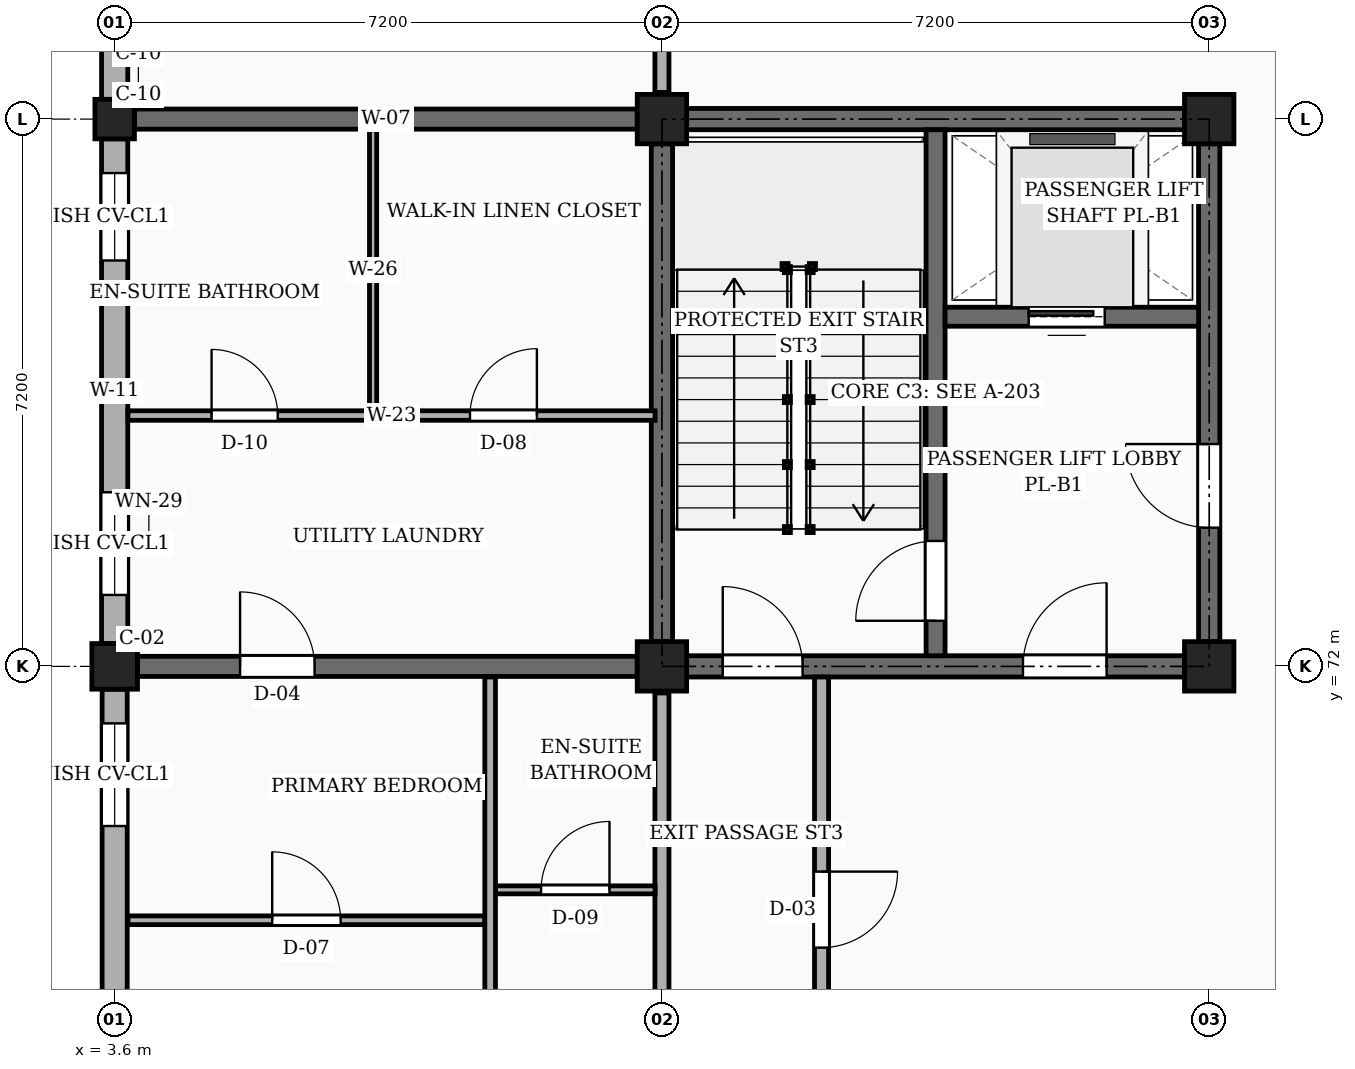
"""IFC4 building model, lengths in metres.
Left out: names, types, materials, properties, quantities, classifications, styles, units other than length and angle.
Written with IfcOpenShell. Run it as: python <this file> out.ifc"""

import sys

from ifc_helpers import new_model, si_unit, direction, frame, frame_2d, origin, origin_2d, place, context, subcontext, project, spatial, rectangle, circle, extrude, element, fill, save


model = new_model("IFC4")
c1 = context("Model", 3, precision=1e-05, world=origin(), true_north=direction((0.0, 1.0)))
c2 = subcontext(c1, "Body", "Model", "MODEL_VIEW")
j1 = project(units=[si_unit("LENGTHUNIT", "METRE"), si_unit("PLANEANGLEUNIT", "RADIAN")], contexts=[c1])
p1 = place(None, origin())
s1 = spatial("IfcSite", under=j1, at=p1, CompositionType="ELEMENT")
p2 = place(p1, origin())
s2 = spatial("IfcBuilding", under=s1, at=p2, CompositionType="ELEMENT")
p3 = place(p2, origin())
s3 = spatial("IfcBuildingStorey", under=s2, at=p3, CompositionType="ELEMENT", Elevation=0.0)
p4 = place(p3, frame((3.6, 72.0, 0.0), z_axis=(0.0, 0.0, 1.0), x_axis=(1.0, 0.0, 0.0)))
e1 = element("IfcColumn", 1, at=p4, inside=s3, PredefinedType="COLUMN", context=c2, shape_type="SweptSolid", body=[
    extrude(rectangle(XDim=0.6, YDim=0.6, at=origin_2d()), origin(), (0.0, 0.0, 1.0), 4.5),
])
p5 = place(p3, frame((3.6, 79.2, 0.0), z_axis=(0.0, 0.0, 1.0), x_axis=(1.0, 0.0, 0.0)))
e2 = element("IfcColumn", 2, at=p5, inside=s3, PredefinedType="COLUMN", context=c2, shape_type="SweptSolid", body=[
    extrude(circle(Radius=0.26, at=origin_2d()), origin(), (0.0, 0.0, 1.0), 4.5),
])
for number, where, z_axis, x_axis in (
    (3, (10.8, 72.0, 0.0), (0.0, 0.0, 1.0), (1.0, 0.0, 0.0)),
    (4, (10.8, 79.2, 0.0), (0.0, 0.0, 1.0), (1.0, 0.0, 0.0)),
    (5, (18.0, 72.0, 0.0), (0.0, 0.0, 1.0), (1.0, 0.0, 0.0)),
    (6, (18.0, 79.2, 0.0), (0.0, 0.0, 1.0), (1.0, 0.0, 0.0)),
):
    element("IfcColumn", number, at=place(p3, frame(where, z_axis=z_axis, x_axis=x_axis)), inside=s3, PredefinedType="COLUMN", context=c2, shape_type="SweptSolid", body=[
        extrude(rectangle(XDim=0.65, YDim=0.65, at=origin_2d()), origin(), (0.0, 0.0, 1.0), 4.5),
    ])
p6 = place(p3, frame((3.9, 72.0, 0.0), z_axis=(0.0, 0.0, 1.0), x_axis=(1.0, 0.0, 0.0)))
e7 = element("IfcWall", 7, at=p6, inside=s3, PredefinedType="SOLIDWALL", context=c2, shape_type="SweptSolid", body=[
    extrude(rectangle(XDim=6.575, YDim=0.265, at=frame_2d((3.288, 0.0))), origin(), (0.0, 0.0, 1.0), 3.56),
])
p7 = place(p6, frame((1.35, 0.0, 0.0)))
e8 = element("IfcOpeningElement", 8, at=p7, cuts=e7, PredefinedType="OPENING", context=c2, shape_type="SweptSolid", body=[
    extrude(rectangle(XDim=0.98, YDim=2.12, at=frame_2d((0.49, 1.06))), frame((0.0, 0.143, 0.0), z_axis=(0.0, -1.0, 0.0), x_axis=(1.0, 0.0, 0.0)), (0.0, 0.0, 1.0), 0.285),
])
p8 = place(p3, frame((3.86, 79.2, 0.0), z_axis=(0.0, 0.0, 1.0), x_axis=(1.0, 0.0, 0.0)))
e9 = element("IfcWall", 9, at=p8, inside=s3, PredefinedType="SOLIDWALL", context=c2, shape_type="SweptSolid", body=[
    extrude(rectangle(XDim=6.615, YDim=0.265, at=frame_2d((3.308, 0.0))), origin(), (0.0, 0.0, 1.0), 3.56),
])
p9 = place(p3, frame((3.6, 86.1, 0.0), z_axis=(0.0, 0.0, 1.0), x_axis=(0.0, -1.0, 0.0)))
e10 = element("IfcWall", 10, at=p9, inside=s3, PredefinedType="SOLIDWALL", context=c2, shape_type="SweptSolid", body=[
    extrude(rectangle(XDim=6.64, YDim=0.345, at=frame_2d((3.32, 0.0))), origin(), (0.0, 0.0, 1.0), 3.83),
])
p10 = place(p9, frame((0.45, 0.0, 0.78)))
e11 = element("IfcOpeningElement", 11, at=p10, cuts=e10, PredefinedType="OPENING", context=c2, shape_type="SweptSolid", body=[
    extrude(rectangle(XDim=0.94, YDim=1.44, at=frame_2d((0.47, 0.72))), frame((0.0, 0.183, 0.0), z_axis=(0.0, -1.0, 0.0), x_axis=(1.0, 0.0, 0.0)), (0.0, 0.0, 1.0), 0.365),
])
p11 = place(p9, frame((4.65, 0.0, 0.78)))
e12 = element("IfcOpeningElement", 12, at=p11, cuts=e10, PredefinedType="OPENING", context=c2, shape_type="SweptSolid", body=[
    extrude(rectangle(XDim=1.15, YDim=1.44, at=frame_2d((0.575, 0.72))), frame((0.0, 0.183, 0.0), z_axis=(0.0, -1.0, 0.0), x_axis=(1.0, 0.0, 0.0)), (0.0, 0.0, 1.0), 0.365),
])
p12 = place(p3, frame((3.6, 78.94, 0.0), z_axis=(0.0, 0.0, 1.0), x_axis=(0.0, -1.0, 0.0)))
e13 = element("IfcWall", 13, at=p12, inside=s3, PredefinedType="SOLIDWALL", context=c2, shape_type="SweptSolid", body=[
    extrude(rectangle(XDim=6.64, YDim=0.345, at=frame_2d((3.32, 0.0))), origin(), (0.0, 0.0, 1.0), 3.83),
])
p13 = place(p12, frame((0.45, 0.0, 0.78)))
e14 = element("IfcOpeningElement", 14, at=p13, cuts=e13, PredefinedType="OPENING", context=c2, shape_type="SweptSolid", body=[
    extrude(rectangle(XDim=1.15, YDim=1.44, at=frame_2d((0.575, 0.72))), frame((0.0, 0.183, 0.0), z_axis=(0.0, -1.0, 0.0), x_axis=(1.0, 0.0, 0.0)), (0.0, 0.0, 1.0), 0.365),
])
p14 = place(p12, frame((4.65, 0.0, 0.78)))
e15 = element("IfcOpeningElement", 15, at=p14, cuts=e13, PredefinedType="OPENING", context=c2, shape_type="SweptSolid", body=[
    extrude(rectangle(XDim=1.35, YDim=1.44, at=frame_2d((0.675, 0.72))), frame((0.0, 0.183, 0.0), z_axis=(0.0, -1.0, 0.0), x_axis=(1.0, 0.0, 0.0)), (0.0, 0.0, 1.0), 0.365),
])
p15 = place(p3, frame((3.6, 71.7, 0.0), z_axis=(0.0, 0.0, 1.0), x_axis=(0.0, -1.0, 0.0)))
e16 = element("IfcWall", 16, at=p15, inside=s3, PredefinedType="SOLIDWALL", context=c2, shape_type="SweptSolid", body=[
    extrude(rectangle(XDim=6.6, YDim=0.33, at=frame_2d((3.3, 0.0))), origin(), (0.0, 0.0, 1.0), 3.83),
])
p16 = place(p15, frame((0.45, 0.0, 0.78)))
e17 = element("IfcOpeningElement", 17, at=p16, cuts=e16, PredefinedType="OPENING", context=c2, shape_type="SweptSolid", body=[
    extrude(rectangle(XDim=1.35, YDim=1.44, at=frame_2d((0.675, 0.72))), frame((0.0, 0.175, 0.0), z_axis=(0.0, -1.0, 0.0), x_axis=(1.0, 0.0, 0.0)), (0.0, 0.0, 1.0), 0.35),
])
p17 = place(p15, frame((4.65, 0.0, 0.78)))
e18 = element("IfcOpeningElement", 18, at=p17, cuts=e16, PredefinedType="OPENING", context=c2, shape_type="SweptSolid", body=[
    extrude(rectangle(XDim=0.85, YDim=1.15, at=frame_2d((0.425, 0.575))), frame((0.0, 0.175, 0.0), z_axis=(0.0, -1.0, 0.0), x_axis=(1.0, 0.0, 0.0)), (0.0, 0.0, 1.0), 0.35),
])
for number, where, z_axis, x_axis in (
    (19, (10.8, 72.325, 0.0), (0.0, 0.0, 1.0), (0.0, 1.0, 0.0)),
    (20, (11.125, 79.2, 0.0), (0.0, 0.0, 1.0), (1.0, 0.0, 0.0)),
):
    element("IfcWall", number, at=place(p3, frame(where, z_axis=z_axis, x_axis=x_axis)), inside=s3, PredefinedType="SHEAR", context=c2, shape_type="SweptSolid", body=[
        extrude(rectangle(XDim=6.55, YDim=0.28, at=frame_2d((3.275, 0.0))), origin(), (0.0, 0.0, 1.0), 4.26),
    ])
p18 = place(p3, frame((18.0, 72.325, 0.0), z_axis=(0.0, 0.0, 1.0), x_axis=(0.0, 1.0, 0.0)))
e21 = element("IfcWall", 21, at=p18, inside=s3, PredefinedType="SHEAR", context=c2, shape_type="SweptSolid", body=[
    extrude(rectangle(XDim=6.55, YDim=0.28, at=frame_2d((3.275, 0.0))), origin(), (0.0, 0.0, 1.0), 4.26),
])
p19 = place(p18, frame((1.5, 0.0, 0.0)))
e22 = element("IfcOpeningElement", 22, at=p19, cuts=e21, PredefinedType="OPENING", context=c2, shape_type="SweptSolid", body=[
    extrude(rectangle(XDim=1.1, YDim=2.15, at=frame_2d((0.55, 1.075))), frame((0.0, 0.15, 0.0), z_axis=(0.0, -1.0, 0.0), x_axis=(1.0, 0.0, 0.0)), (0.0, 0.0, 1.0), 0.3),
])
p20 = place(p3, frame((11.125, 72.0, 0.0), z_axis=(0.0, 0.0, 1.0), x_axis=(1.0, 0.0, 0.0)))
e23 = element("IfcWall", 23, at=p20, inside=s3, PredefinedType="SHEAR", context=c2, shape_type="SweptSolid", body=[
    extrude(rectangle(XDim=6.55, YDim=0.28, at=frame_2d((3.275, 0.0))), origin(), (0.0, 0.0, 1.0), 4.26),
])
p21 = place(p20, frame((4.425, 0.0, 0.0)))
e24 = element("IfcOpeningElement", 24, at=p21, cuts=e23, PredefinedType="OPENING", context=c2, shape_type="SweptSolid", body=[
    extrude(rectangle(XDim=1.1, YDim=2.15, at=frame_2d((0.55, 1.075))), frame((0.0, 0.15, 0.0), z_axis=(0.0, -1.0, 0.0), x_axis=(1.0, 0.0, 0.0)), (0.0, 0.0, 1.0), 0.3),
])
p22 = place(p20, frame((0.475, 0.0, 0.0)))
e25 = element("IfcOpeningElement", 25, at=p22, cuts=e23, PredefinedType="OPENING", context=c2, shape_type="SweptSolid", body=[
    extrude(rectangle(XDim=1.05, YDim=2.15, at=frame_2d((0.525, 1.075))), frame((0.0, 0.15, 0.0), z_axis=(0.0, -1.0, 0.0), x_axis=(1.0, 0.0, 0.0)), (0.0, 0.0, 1.0), 0.3),
])
p23 = place(p3, frame((14.4, 72.14, 0.0), z_axis=(0.0, 0.0, 1.0), x_axis=(0.0, 1.0, 0.0)))
e26 = element("IfcWall", 26, at=p23, inside=s3, PredefinedType="SHEAR", context=c2, shape_type="SweptSolid", body=[
    extrude(rectangle(XDim=6.92, YDim=0.25, at=frame_2d((3.46, 0.0))), origin(), (0.0, 0.0, 1.0), 4.26),
])
p24 = place(p23, frame((0.46, 0.0, 0.0)))
e27 = element("IfcOpeningElement", 27, at=p24, cuts=e26, PredefinedType="OPENING", context=c2, shape_type="SweptSolid", body=[
    extrude(rectangle(XDim=1.05, YDim=2.15, at=frame_2d((0.525, 1.075))), frame((0.0, 0.135, 0.0), z_axis=(0.0, -1.0, 0.0), x_axis=(1.0, 0.0, 0.0)), (0.0, 0.0, 1.0), 0.27),
])
p25 = place(p3, frame((14.525, 76.6, 0.0), z_axis=(0.0, 0.0, 1.0), x_axis=(1.0, 0.0, 0.0)))
e28 = element("IfcWall", 28, at=p25, inside=s3, PredefinedType="SHEAR", context=c2, shape_type="SweptSolid", body=[
    extrude(rectangle(XDim=3.335, YDim=0.25, at=frame_2d((1.667, 0.0))), origin(), (0.0, 0.0, 1.0), 4.26),
])
p26 = place(p25, frame((1.1, 0.0, 0.0)))
e29 = element("IfcOpeningElement", 29, at=p26, cuts=e28, PredefinedType="OPENING", context=c2, shape_type="SweptSolid", body=[
    extrude(rectangle(XDim=1.0, YDim=2.2, at=frame_2d((0.5, 1.1))), frame((0.0, 0.135, 0.0), z_axis=(0.0, -1.0, 0.0), x_axis=(1.0, 0.0, 0.0)), (0.0, 0.0, 1.0), 0.27),
])
p27 = place(p3, frame((10.8, 65.15, 0.0), z_axis=(0.0, 0.0, 1.0), x_axis=(0.0, 1.0, 0.0)))
e30 = element("IfcWall", 30, at=p27, inside=s3, PredefinedType="PARTITIONING", context=c2, shape_type="SweptSolid", body=[
    extrude(rectangle(XDim=6.5, YDim=0.185, at=frame_2d((3.25, 0.0))), origin(), (0.0, 0.0, 1.0), 3.51),
])
p28 = place(p27, frame((1.0, 0.0, 0.0)))
e31 = element("IfcOpeningElement", 31, at=p28, cuts=e30, PredefinedType="OPENING", context=c2, shape_type="SweptSolid", body=[
    extrude(rectangle(XDim=1.14, YDim=2.18, at=frame_2d((0.57, 1.09))), frame((0.0, 0.103, 0.0), z_axis=(0.0, -1.0, 0.0), x_axis=(1.0, 0.0, 0.0)), (0.0, 0.0, 1.0), 0.205),
])
p29 = place(p3, frame((10.8, 79.55, 0.0), z_axis=(0.0, 0.0, 1.0), x_axis=(0.0, 1.0, 0.0)))
e32 = element("IfcWall", 32, at=p29, inside=s3, PredefinedType="PARTITIONING", context=c2, shape_type="SweptSolid", body=[
    extrude(rectangle(XDim=6.5, YDim=0.185, at=frame_2d((3.25, 0.0))), origin(), (0.0, 0.0, 1.0), 3.51),
])
p30 = place(p29, frame((1.1, 0.0, 0.0)))
e33 = element("IfcOpeningElement", 33, at=p30, cuts=e32, PredefinedType="OPENING", context=c2, shape_type="SweptSolid", body=[
    extrude(rectangle(XDim=1.0, YDim=2.15, at=frame_2d((0.5, 1.075))), frame((0.0, 0.103, 0.0), z_axis=(0.0, -1.0, 0.0), x_axis=(1.0, 0.0, 0.0)), (0.0, 0.0, 1.0), 0.205),
])
p31 = place(p3, frame((3.775, 68.66, 0.0), z_axis=(0.0, 0.0, 1.0), x_axis=(1.0, 0.0, 0.0)))
e34 = element("IfcWall", 34, at=p31, inside=s3, PredefinedType="PARTITIONING", context=c2, shape_type="SweptSolid", body=[
    extrude(rectangle(XDim=4.695, YDim=0.115, at=frame_2d((2.348, 0.0))), origin(), (0.0, 0.0, 1.0), 3.695),
])
p32 = place(p31, frame((1.897, 0.0, 0.0)))
e35 = element("IfcOpeningElement", 35, at=p32, cuts=e34, PredefinedType="OPENING", context=c2, shape_type="SweptSolid", body=[
    extrude(rectangle(XDim=0.9, YDim=2.1, at=frame_2d((0.45, 1.05))), frame((0.0, 0.067, 0.0), z_axis=(0.0, -1.0, 0.0), x_axis=(1.0, 0.0, 0.0)), (0.0, 0.0, 1.0), 0.135),
])
p33 = place(p3, frame((8.61, 69.06, 0.0), z_axis=(0.0, 0.0, 1.0), x_axis=(1.0, 0.0, 0.0)))
e36 = element("IfcWall", 36, at=p33, inside=s3, PredefinedType="PARTITIONING", context=c2, shape_type="SweptSolid", body=[
    extrude(rectangle(XDim=2.1, YDim=0.105, at=frame_2d((1.05, 0.0))), origin(), (0.0, 0.0, 1.0), 3.695),
])
p34 = place(p33, frame((0.6, 0.0, 0.0)))
e37 = element("IfcOpeningElement", 37, at=p34, cuts=e36, PredefinedType="OPENING", context=c2, shape_type="SweptSolid", body=[
    extrude(rectangle(XDim=0.9, YDim=2.05, at=frame_2d((0.45, 1.025))), frame((0.0, 0.062, 0.0), z_axis=(0.0, -1.0, 0.0), x_axis=(1.0, 0.0, 0.0)), (0.0, 0.0, 1.0), 0.125),
])
p35 = place(p3, frame((8.54, 64.975, 0.0), z_axis=(0.0, 0.0, 1.0), x_axis=(0.0, 1.0, 0.0)))
e38 = element("IfcWall", 38, at=p35, inside=s3, PredefinedType="PARTITIONING", context=c2, shape_type="SweptSolid", body=[
    extrude(rectangle(XDim=6.885, YDim=0.14, at=frame_2d((3.442, 0.0))), origin(), (0.0, 0.0, 1.0), 3.695),
])
p36 = place(p35, frame((1.275, 0.0, 0.0)))
e39 = element("IfcOpeningElement", 39, at=p36, cuts=e38, PredefinedType="OPENING", context=c2, shape_type="SweptSolid", body=[
    extrude(rectangle(XDim=0.95, YDim=2.1, at=frame_2d((0.475, 1.05))), frame((0.0, 0.08, 0.0), z_axis=(0.0, -1.0, 0.0), x_axis=(1.0, 0.0, 0.0)), (0.0, 0.0, 1.0), 0.16),
])
p37 = place(p3, frame((3.775, 75.3, 0.0), z_axis=(0.0, 0.0, 1.0), x_axis=(1.0, 0.0, 0.0)))
e40 = element("IfcWall", 40, at=p37, inside=s3, PredefinedType="PARTITIONING", context=c2, shape_type="SweptSolid", body=[
    extrude(rectangle(XDim=6.935, YDim=0.125, at=frame_2d((3.468, 0.0))), origin(), (0.0, 0.0, 1.0), 3.695),
])
p38 = place(p37, frame((1.1, 0.0, 0.0)))
e41 = element("IfcOpeningElement", 41, at=p38, cuts=e40, PredefinedType="OPENING", context=c2, shape_type="SweptSolid", body=[
    extrude(rectangle(XDim=0.87, YDim=2.05, at=frame_2d((0.435, 1.025))), frame((0.0, 0.073, 0.0), z_axis=(0.0, -1.0, 0.0), x_axis=(1.0, 0.0, 0.0)), (0.0, 0.0, 1.0), 0.145),
])
p39 = place(p37, frame((4.5, 0.0, 0.0)))
e42 = element("IfcOpeningElement", 42, at=p39, cuts=e40, PredefinedType="OPENING", context=c2, shape_type="SweptSolid", body=[
    extrude(rectangle(XDim=0.88, YDim=2.08, at=frame_2d((0.44, 1.04))), frame((0.0, 0.073, 0.0), z_axis=(0.0, -1.0, 0.0), x_axis=(1.0, 0.0, 0.0)), (0.0, 0.0, 1.0), 0.145),
])
p40 = place(p3, frame((7.0, 75.37, 0.0), z_axis=(0.0, 0.0, 1.0), x_axis=(0.0, 1.0, 0.0)))
e43 = element("IfcWall", 43, at=p40, inside=s3, PredefinedType="PARTITIONING", context=c2, shape_type="SweptSolid", body=[
    extrude(rectangle(XDim=3.69, YDim=0.095, at=frame_2d((1.845, 0.0))), origin(), (0.0, 0.0, 1.0), 3.695),
])
p41 = place(p3, frame((12.9, 71.86, 0.0), z_axis=(0.0, 0.0, 1.0), x_axis=(0.0, -1.0, 0.0)))
e44 = element("IfcWall", 44, at=p41, inside=s3, PredefinedType="PARTITIONING", context=c2, shape_type="SweptSolid", body=[
    extrude(rectangle(XDim=6.9, YDim=0.185, at=frame_2d((3.45, 0.0))), origin(), (0.0, 0.0, 1.0), 3.695),
])
p42 = place(p41, frame((2.56, 0.0, 0.0)))
e45 = element("IfcOpeningElement", 45, at=p42, cuts=e44, PredefinedType="OPENING", context=c2, shape_type="SweptSolid", body=[
    extrude(rectangle(XDim=1.0, YDim=2.15, at=frame_2d((0.5, 1.075))), frame((0.0, 0.103, 0.0), z_axis=(0.0, -1.0, 0.0), x_axis=(1.0, 0.0, 0.0)), (0.0, 0.0, 1.0), 0.205),
])
p43 = place(p13, origin())
e46 = element("IfcWindow", 46, at=p43, inside=s3, PartitioningType="SINGLE_PANEL", PredefinedType="WINDOW", context=c2, shape_type="SweptSolid", body=[
    extrude(rectangle(XDim=1.15, YDim=1.44, at=frame_2d((0.575, 0.72))), frame((0.0, 0.03, 0.0), z_axis=(0.0, -1.0, 0.0), x_axis=(1.0, 0.0, 0.0)), (0.0, 0.0, 1.0), 0.06),
])
fill(e14, e46)
p44 = place(p14, origin())
e47 = element("IfcWindow", 47, at=p44, inside=s3, PartitioningType="SINGLE_PANEL", PredefinedType="WINDOW", context=c2, shape_type="SweptSolid", body=[
    extrude(rectangle(XDim=1.35, YDim=1.44, at=frame_2d((0.675, 0.72))), frame((0.0, 0.03, 0.0), z_axis=(0.0, -1.0, 0.0), x_axis=(1.0, 0.0, 0.0)), (0.0, 0.0, 1.0), 0.06),
])
fill(e15, e47)
p45 = place(p16, origin())
e48 = element("IfcWindow", 48, at=p45, inside=s3, PartitioningType="SINGLE_PANEL", PredefinedType="WINDOW", context=c2, shape_type="SweptSolid", body=[
    extrude(rectangle(XDim=1.35, YDim=1.44, at=frame_2d((0.675, 0.72))), frame((0.0, 0.03, 0.0), z_axis=(0.0, -1.0, 0.0), x_axis=(1.0, 0.0, 0.0)), (0.0, 0.0, 1.0), 0.06),
])
fill(e17, e48)
p46 = place(p19, frame((1.1, 0.0, 0.0), z_axis=(0.0, 0.0, 1.0), x_axis=(-1.0, 0.0, 0.0)))
e49 = element("IfcDoor", 49, at=p46, inside=s3, OperationType="SINGLE_SWING_RIGHT", PredefinedType="DOOR", context=c2, shape_type="SweptSolid", body=[
    extrude(rectangle(XDim=1.1, YDim=2.15, at=frame_2d((0.55, 1.075))), frame((0.0, 0.025, 0.0), z_axis=(0.0, -1.0, 0.0), x_axis=(1.0, 0.0, 0.0)), (0.0, 0.0, 1.0), 0.05),
])
fill(e22, e49)
p47 = place(p21, frame((1.1, 0.0, 0.0), z_axis=(0.0, 0.0, 1.0), x_axis=(-1.0, 0.0, 0.0)))
e50 = element("IfcDoor", 50, at=p47, inside=s3, OperationType="SINGLE_SWING_RIGHT", PredefinedType="DOOR", context=c2, shape_type="SweptSolid", body=[
    extrude(rectangle(XDim=1.1, YDim=2.15, at=frame_2d((0.55, 1.075))), frame((0.0, 0.025, 0.0), z_axis=(0.0, -1.0, 0.0), x_axis=(1.0, 0.0, 0.0)), (0.0, 0.0, 1.0), 0.05),
])
fill(e24, e50)
p48 = place(p24, frame((1.05, 0.0, 0.0), z_axis=(0.0, 0.0, 1.0), x_axis=(-1.0, 0.0, 0.0)))
e51 = element("IfcDoor", 51, at=p48, inside=s3, OperationType="SINGLE_SWING_LEFT", PredefinedType="DOOR", context=c2, shape_type="SweptSolid", body=[
    extrude(rectangle(XDim=1.05, YDim=2.15, at=frame_2d((0.525, 1.075))), frame((0.0, 0.025, 0.0), z_axis=(0.0, -1.0, 0.0), x_axis=(1.0, 0.0, 0.0)), (0.0, 0.0, 1.0), 0.05),
])
fill(e27, e51)
p49 = place(p26, origin())
e52 = element("IfcDoor", 52, at=p49, inside=s3, OperationType="SLIDING_TO_LEFT", PredefinedType="DOOR", context=c2, shape_type="SweptSolid", body=[
    extrude(rectangle(XDim=1.0, YDim=2.2, at=frame_2d((0.5, 1.1))), frame((0.0, 0.025, 0.0), z_axis=(0.0, -1.0, 0.0), x_axis=(1.0, 0.0, 0.0)), (0.0, 0.0, 1.0), 0.05),
])
fill(e29, e52)
p50 = place(p32, origin())
e53 = element("IfcDoor", 53, at=p50, inside=s3, OperationType="SINGLE_SWING_LEFT", PredefinedType="DOOR", context=c2, shape_type="SweptSolid", body=[
    extrude(rectangle(XDim=0.9, YDim=2.1, at=frame_2d((0.45, 1.05))), frame((0.0, 0.025, 0.0), z_axis=(0.0, -1.0, 0.0), x_axis=(1.0, 0.0, 0.0)), (0.0, 0.0, 1.0), 0.05),
])
fill(e35, e53)
p51 = place(p34, origin())
e54 = element("IfcDoor", 54, at=p51, inside=s3, OperationType="SINGLE_SWING_RIGHT", PredefinedType="DOOR", context=c2, shape_type="SweptSolid", body=[
    extrude(rectangle(XDim=0.9, YDim=2.05, at=frame_2d((0.45, 1.025))), frame((0.0, 0.025, 0.0), z_axis=(0.0, -1.0, 0.0), x_axis=(1.0, 0.0, 0.0)), (0.0, 0.0, 1.0), 0.05),
])
fill(e37, e54)
p52 = place(p38, origin())
e55 = element("IfcDoor", 55, at=p52, inside=s3, OperationType="SINGLE_SWING_LEFT", PredefinedType="DOOR", context=c2, shape_type="SweptSolid", body=[
    extrude(rectangle(XDim=0.87, YDim=2.05, at=frame_2d((0.435, 1.025))), frame((0.0, 0.025, 0.0), z_axis=(0.0, -1.0, 0.0), x_axis=(1.0, 0.0, 0.0)), (0.0, 0.0, 1.0), 0.05),
])
fill(e41, e55)
p53 = place(p39, origin())
e56 = element("IfcDoor", 56, at=p53, inside=s3, OperationType="SINGLE_SWING_RIGHT", PredefinedType="DOOR", context=c2, shape_type="SweptSolid", body=[
    extrude(rectangle(XDim=0.88, YDim=2.08, at=frame_2d((0.44, 1.04))), frame((0.0, 0.025, 0.0), z_axis=(0.0, -1.0, 0.0), x_axis=(1.0, 0.0, 0.0)), (0.0, 0.0, 1.0), 0.05),
])
fill(e42, e56)
p54 = place(p7, origin())
e57 = element("IfcDoor", 57, at=p54, inside=s3, OperationType="SINGLE_SWING_LEFT", PredefinedType="DOOR", context=c2, shape_type="SweptSolid", body=[
    extrude(rectangle(XDim=0.98, YDim=2.12, at=frame_2d((0.49, 1.06))), frame((0.0, 0.025, 0.0), z_axis=(0.0, -1.0, 0.0), x_axis=(1.0, 0.0, 0.0)), (0.0, 0.0, 1.0), 0.05),
])
fill(e8, e57)
p55 = place(p22, frame((1.05, 0.0, 0.0), z_axis=(0.0, 0.0, 1.0), x_axis=(-1.0, 0.0, 0.0)))
e58 = element("IfcDoor", 58, at=p55, inside=s3, OperationType="SINGLE_SWING_LEFT", PredefinedType="DOOR", context=c2, shape_type="SweptSolid", body=[
    extrude(rectangle(XDim=1.05, YDim=2.15, at=frame_2d((0.525, 1.075))), frame((0.0, 0.025, 0.0), z_axis=(0.0, -1.0, 0.0), x_axis=(1.0, 0.0, 0.0)), (0.0, 0.0, 1.0), 0.05),
])
fill(e25, e58)
p56 = place(p42, origin())
e59 = element("IfcDoor", 59, at=p56, inside=s3, OperationType="SINGLE_SWING_LEFT", PredefinedType="DOOR", context=c2, shape_type="SweptSolid", body=[
    extrude(rectangle(XDim=1.0, YDim=2.15, at=frame_2d((0.5, 1.075))), frame((0.0, 0.025, 0.0), z_axis=(0.0, -1.0, 0.0), x_axis=(1.0, 0.0, 0.0)), (0.0, 0.0, 1.0), 0.05),
])
fill(e45, e59)
save(model, sys.argv[1])
